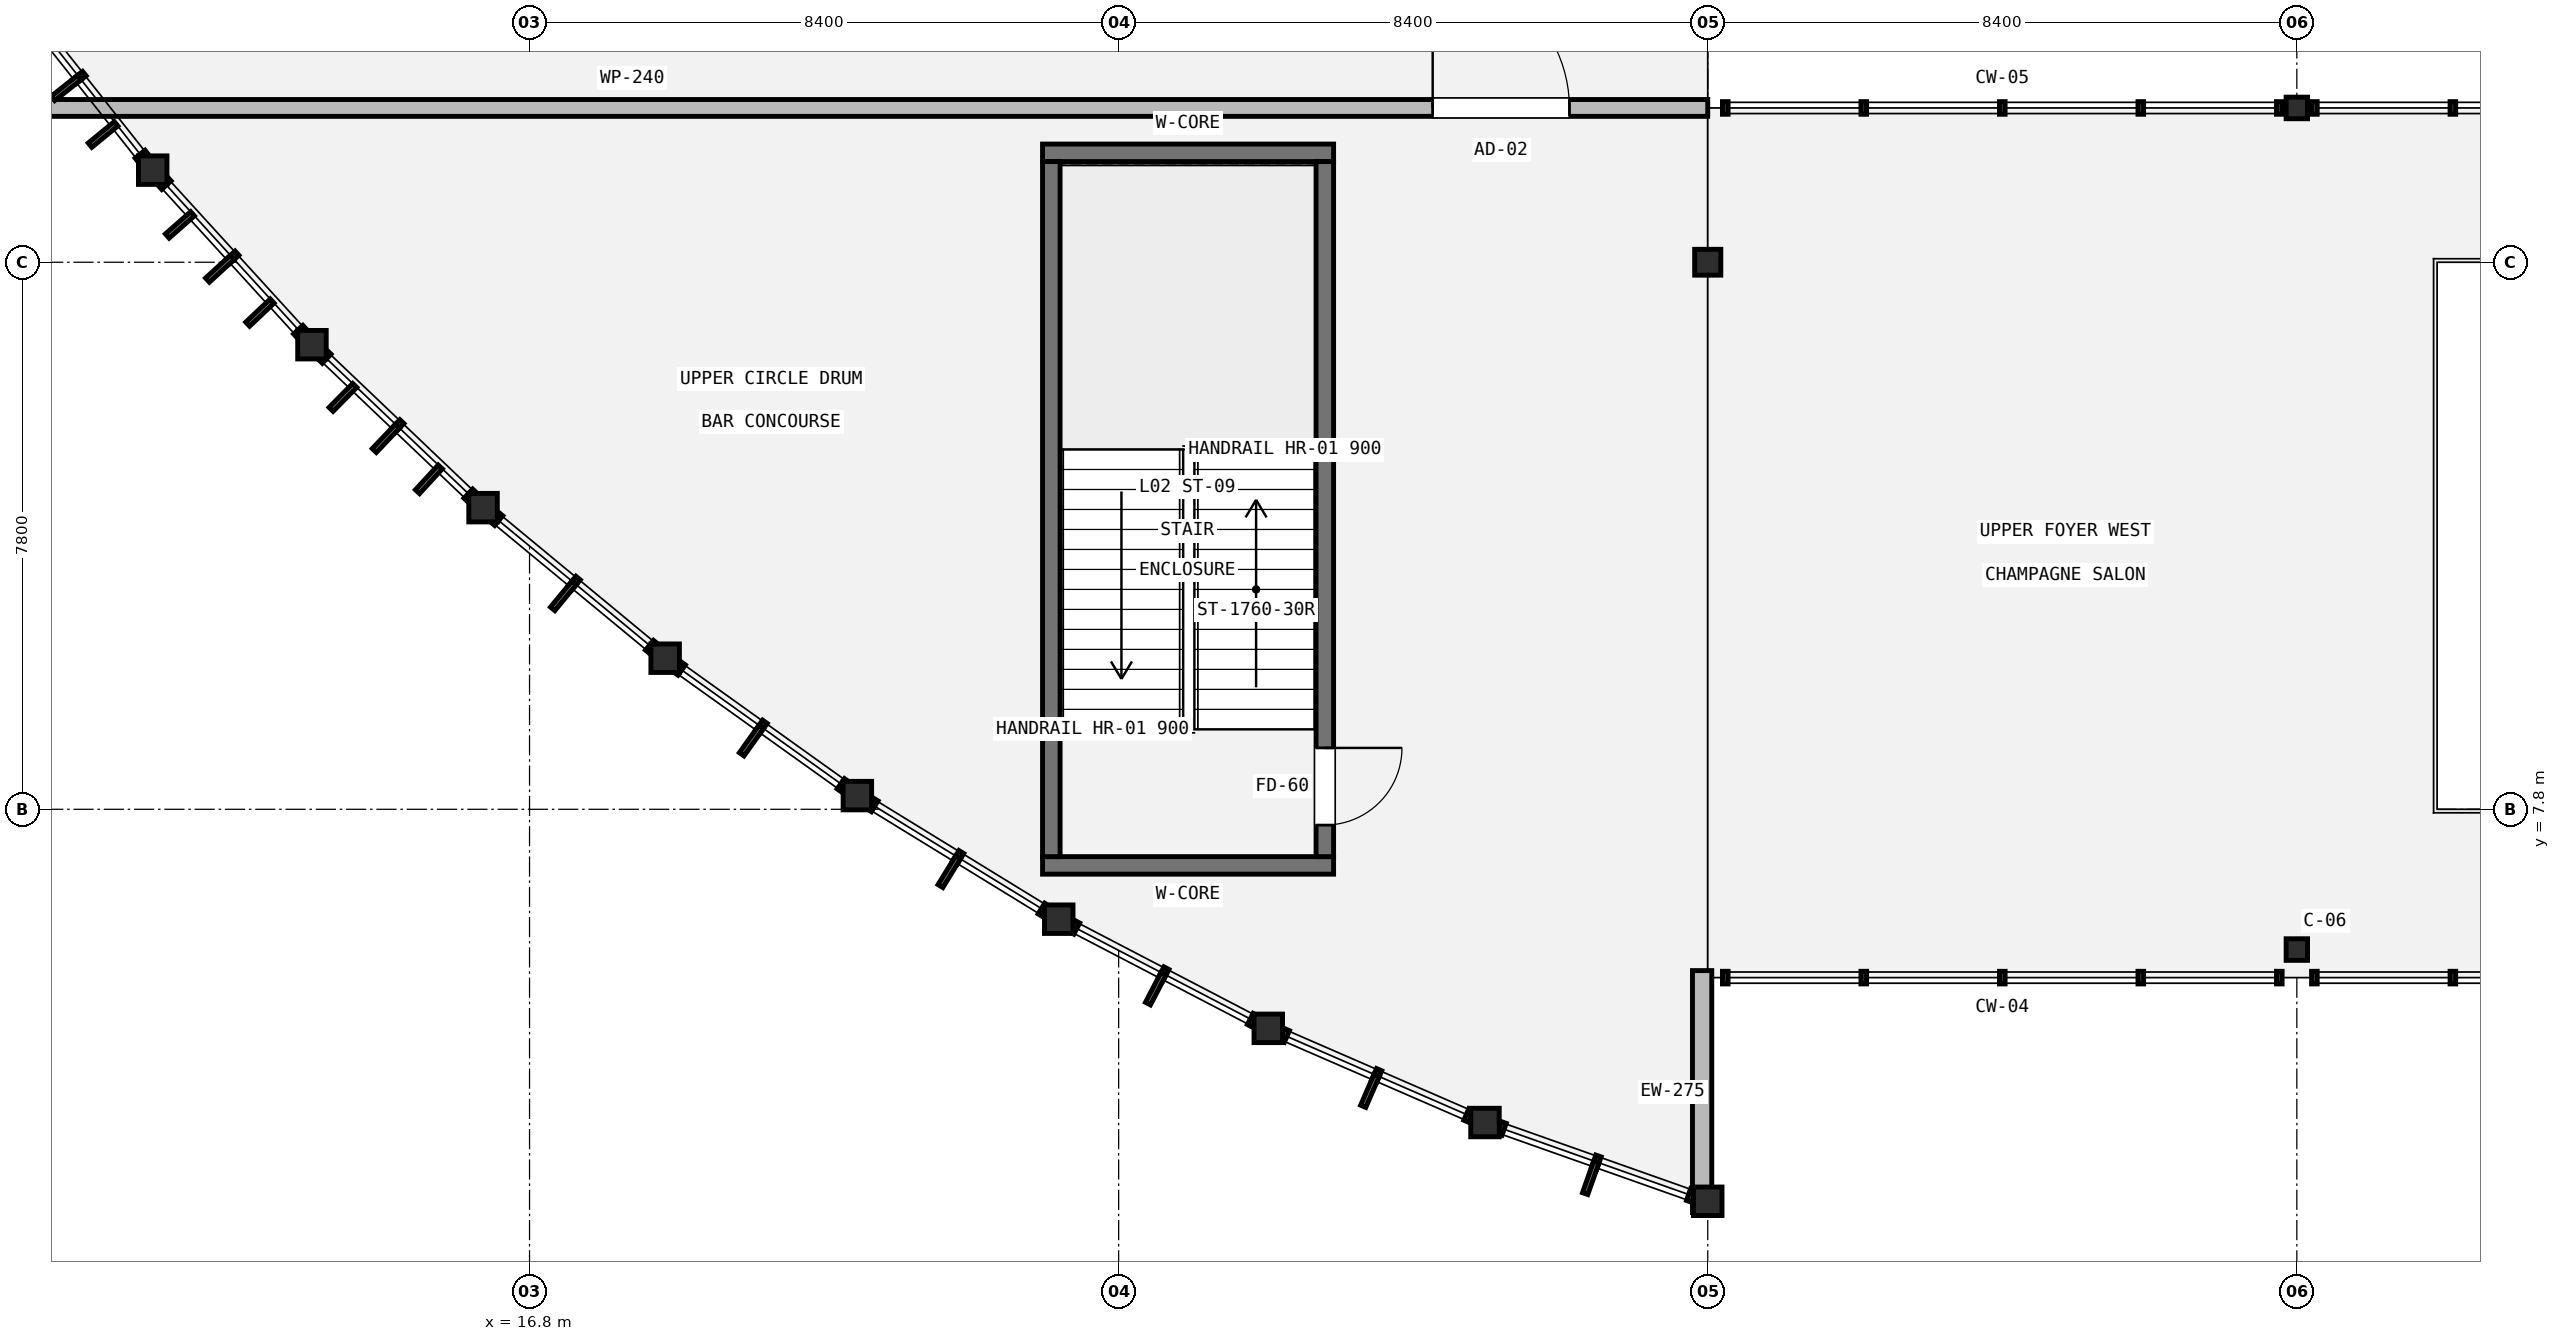
"""IFC4 building model, lengths in metres.
Left out: names, types, materials, properties, quantities, classifications, styles, units other than length and angle.
Written with IfcOpenShell. Run it as: python <this file> out.ifc"""

import sys

from ifc_helpers import new_model, si_unit, direction, frame, frame_2d, origin, origin_2d, place, context, subcontext, project, spatial, rectangle, hollow_circle, i_section, extrude, element, fill, save


model = new_model("IFC4")
c1 = context("Model", 3, precision=1e-05, world=origin(), true_north=direction((0.0, 1.0)))
c2 = subcontext(c1, "Body", "Model", "MODEL_VIEW")
j1 = project(units=[si_unit("LENGTHUNIT", "METRE"), si_unit("PLANEANGLEUNIT", "RADIAN")], contexts=[c1])
p1 = place(None, origin())
s1 = spatial("IfcSite", under=j1, at=p1, CompositionType="ELEMENT")
p2 = place(p1, origin())
s2 = spatial("IfcBuilding", under=s1, at=p2, CompositionType="ELEMENT")
p3 = place(p2, frame((0.0, 0.0, 10.2)))
s3 = spatial("IfcBuildingStorey", under=s2, at=p3, CompositionType="ELEMENT", Elevation=10.2)
p4 = place(p3, frame((33.6, 15.6, 0.0), z_axis=(0.0, 0.0, 1.0), x_axis=(1.0, 0.0, 0.0)))
e1 = element("IfcColumn", 1, at=p4, inside=s3, PredefinedType="COLUMN", context=c2, shape_type="SweptSolid", body=[
    extrude(i_section(OverallWidth=0.373, OverallDepth=0.368, WebThickness=0.014, FlangeThickness=0.024, FilletRadius=0.015, at=origin_2d()), origin(), (0.0, 0.0, 1.0), 4.8),
])
for number, where, z_axis, x_axis in (
    (2, (11.427, 16.913, 0.0), (0.0, 0.0, 1.0), (1.0, 0.0, 0.0)),
    (3, (13.698, 14.424, 0.0), (0.0, 0.0, 1.0), (1.0, 0.0, 0.0)),
    (4, (16.137, 12.101, 0.0), (0.0, 0.0, 1.0), (1.0, 0.0, 0.0)),
    (5, (18.734, 9.954, 0.0), (0.0, 0.0, 1.0), (1.0, 0.0, 0.0)),
    (6, (21.474, 7.995, 0.0), (0.0, 0.0, 1.0), (1.0, 0.0, 0.0)),
    (7, (24.346, 6.233, 0.0), (0.0, 0.0, 1.0), (1.0, 0.0, 0.0)),
    (8, (27.334, 4.677, 0.0), (0.0, 0.0, 1.0), (1.0, 0.0, 0.0)),
    (9, (30.424, 3.334, 0.0), (0.0, 0.0, 1.0), (1.0, 0.0, 0.0)),
    (10, (33.6, 2.211, 0.0), (0.0, 0.0, 1.0), (1.0, 0.0, 0.0)),
):
    element("IfcColumn", number, at=place(p3, frame(where, z_axis=z_axis, x_axis=x_axis)), inside=s3, PredefinedType="COLUMN", context=c2, shape_type="SweptSolid", body=[
        extrude(hollow_circle(Radius=0.203, WallThickness=0.016, at=origin_2d()), origin(), (0.0, 0.0, 1.0), 4.8),
    ])
for number, where, z_axis, x_axis in (
    (11, (42.0, 5.8, 0.0), (0.0, 0.0, 1.0), (1.0, 0.0, 0.0)),
    (12, (42.0, 17.8, 0.0), (0.0, 0.0, 1.0), (1.0, 0.0, 0.0)),
):
    element("IfcColumn", number, at=place(p3, frame(where, z_axis=z_axis, x_axis=x_axis)), inside=s3, PredefinedType="COLUMN", context=c2, shape_type="SweptSolid", body=[
        extrude(i_section(OverallWidth=0.305, OverallDepth=0.308, WebThickness=0.01, FlangeThickness=0.015, FilletRadius=0.015, at=origin_2d()), origin(), (0.0, 0.0, 1.0), 4.8),
    ])
p5 = place(p3, frame((33.52, 2.05, 0.0), z_axis=(0.0, 0.0, 1.0), x_axis=(0.0, 1.0, 0.0)))
e13 = element("IfcWall", 13, at=p5, inside=s3, PredefinedType="STANDARD", context=c2, shape_type="SweptSolid", body=[
    extrude(rectangle(XDim=3.45, YDim=0.275, at=frame_2d((1.725, 0.0))), origin(), (0.0, 0.0, 1.0), 4.192),
])
for number, where, z_axis, x_axis in (
    (14, (28.265, 7.0, 0.0), (0.0, 0.0, 1.0), (-1.0, 0.0, 0.0)),
    (15, (24.115, 17.16, 0.0), (0.0, 0.0, 1.0), (1.0, 0.0, 0.0)),
):
    element("IfcWall", number, at=place(p3, frame(where, z_axis=z_axis, x_axis=x_axis)), inside=s3, PredefinedType="SHEAR", context=c2, shape_type="SweptSolid", body=[
        extrude(rectangle(XDim=4.15, YDim=0.25, at=frame_2d((2.075, 0.0))), origin(), (0.0, 0.0, 1.0), 4.6),
    ])
p6 = place(p3, frame((24.24, 7.125, 0.0), z_axis=(0.0, 0.0, 1.0), x_axis=(0.0, 1.0, 0.0)))
e16 = element("IfcWall", 16, at=p6, inside=s3, PredefinedType="SHEAR", context=c2, shape_type="SweptSolid", body=[
    extrude(rectangle(XDim=9.91, YDim=0.25, at=frame_2d((4.955, 0.0))), origin(), (0.0, 0.0, 1.0), 4.6),
])
p7 = place(p3, frame((28.14, 17.035, 0.0), z_axis=(0.0, 0.0, 1.0), x_axis=(0.0, -1.0, 0.0)))
e17 = element("IfcWall", 17, at=p7, inside=s3, PredefinedType="SHEAR", context=c2, shape_type="SweptSolid", body=[
    extrude(rectangle(XDim=9.91, YDim=0.25, at=frame_2d((4.955, 0.0))), origin(), (0.0, 0.0, 1.0), 4.6),
])
p8 = place(p7, frame((8.36, 0.0, 0.0)))
e18 = element("IfcOpeningElement", 18, at=p8, cuts=e17, PredefinedType="OPENING", context=c2, shape_type="SweptSolid", body=[
    extrude(rectangle(XDim=1.1, YDim=2.15, at=frame_2d((0.55, 1.075))), frame((0.0, 0.135, 0.0), z_axis=(0.0, -1.0, 0.0), x_axis=(1.0, 0.0, 0.0)), (0.0, 0.0, 1.0), 0.27),
])
p9 = place(p3, frame((7.0, 17.8, 0.0), z_axis=(0.0, 0.0, 1.0), x_axis=(1.0, 0.0, 0.0)))
e19 = element("IfcWall", 19, at=p9, inside=s3, PredefinedType="PARTITIONING", context=c2, shape_type="SweptSolid", body=[
    extrude(rectangle(XDim=26.6, YDim=0.24, at=frame_2d((13.3, 0.0))), origin(), (0.0, 0.0, 1.0), 4.053),
])
p10 = place(p9, frame((22.678, 0.0, 0.0)))
e20 = element("IfcOpeningElement", 20, at=p10, cuts=e19, PredefinedType="OPENING", context=c2, shape_type="SweptSolid", body=[
    extrude(rectangle(XDim=1.95, YDim=2.35, at=frame_2d((0.975, 1.175))), frame((0.0, 0.13, 0.0), z_axis=(0.0, -1.0, 0.0), x_axis=(1.0, 0.0, 0.0)), (0.0, 0.0, 1.0), 0.26),
])
p11 = place(p8, origin())
e21 = element("IfcDoor", 21, at=p11, inside=s3, OperationType="SINGLE_SWING_LEFT", PredefinedType="DOOR", context=c2, shape_type="SweptSolid", body=[
    extrude(rectangle(XDim=1.1, YDim=2.15, at=frame_2d((0.55, 1.075))), frame((0.0, 0.025, 0.0), z_axis=(0.0, -1.0, 0.0), x_axis=(1.0, 0.0, 0.0)), (0.0, 0.0, 1.0), 0.05),
])
fill(e18, e21)
p12 = place(p10, origin())
e22 = element("IfcDoor", 22, at=p12, inside=s3, OperationType="SINGLE_SWING_LEFT", PredefinedType="DOOR", context=c2, shape_type="SweptSolid", body=[
    extrude(rectangle(XDim=1.95, YDim=2.35, at=frame_2d((0.975, 1.175))), frame((0.0, 0.025, 0.0), z_axis=(0.0, -1.0, 0.0), x_axis=(1.0, 0.0, 0.0)), (0.0, 0.0, 1.0), 0.05),
])
fill(e20, e22)
save(model, sys.argv[1])
